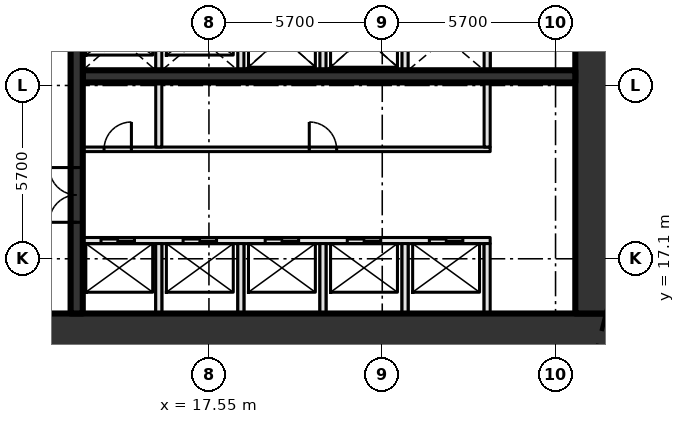
"""IFC4 building model, lengths in metres.
Left out: names, types, materials, properties, quantities, classifications, styles, units other than length and angle.
Written with IfcOpenShell. Run it as: python <this file> out.ifc"""

import sys

from ifc_helpers import new_model, si_unit, direction, frame, frame_2d, origin, place, context, subcontext, project, spatial, rectangle, extrude, element, fill, save


model = new_model("IFC4")
c1 = context("Model", 3, precision=1e-05, world=origin(), true_north=direction((0.0, 1.0)))
c2 = subcontext(c1, "Body", "Model", "MODEL_VIEW")
j1 = project(units=[si_unit("LENGTHUNIT", "METRE"), si_unit("PLANEANGLEUNIT", "RADIAN")], contexts=[c1])
p1 = place(None, origin())
s1 = spatial("IfcSite", under=j1, at=p1, CompositionType="ELEMENT")
p2 = place(p1, origin())
s2 = spatial("IfcBuilding", under=s1, at=p2, CompositionType="ELEMENT")
p3 = place(p2, frame((0.0, 0.0, 12.6)))
s3 = spatial("IfcBuildingStorey", under=s2, at=p3, CompositionType="ELEMENT", Elevation=12.6)
p4 = place(p3, frame((8.0, 14.7, -0.45), z_axis=(0.0, 0.0, 1.0), x_axis=(1.0, 0.0, 0.0)))
e1 = element("IfcWall", 1, at=p4, inside=s3, PredefinedType="SHEAR", context=c2, shape_type="SweptSolid", body=[
    extrude(rectangle(XDim=22.8, YDim=1.2, at=frame_2d((11.4, 0.0))), origin(), (0.0, 0.0, 1.0), 6.0),
])
p5 = place(p4, frame((2.3, 0.0, 0.45)))
e2 = element("IfcOpeningElement", 2, at=p5, cuts=e1, PredefinedType="OPENING", context=c2, shape_type="SweptSolid", body=[
    extrude(rectangle(XDim=1.8, YDim=2.1, at=frame_2d((0.9, 1.05))), frame((0.0, 0.61, 0.0), z_axis=(0.0, -1.0, 0.0), x_axis=(1.0, 0.0, 0.0)), (0.0, 0.0, 1.0), 1.22),
])
p6 = place(p3, frame((30.2, 15.3, -0.45), z_axis=(0.0, 0.0, 1.0), x_axis=(0.0, 1.0, 0.0)))
e3 = element("IfcWall", 3, at=p6, inside=s3, PredefinedType="SHEAR", context=c2, shape_type="SweptSolid", body=[
    extrude(rectangle(XDim=20.4, YDim=1.2, at=frame_2d((10.2, 0.0))), origin(), (0.0, 0.0, 1.0), 6.0),
])
p7 = place(p3, frame((13.4, 17.7, 0.0), z_axis=(0.0, 0.0, 1.0), x_axis=(1.0, 0.0, 0.0)))
e4 = element("IfcWall", 4, at=p7, inside=s3, PredefinedType="SOLIDWALL", context=c2, shape_type="SweptSolid", body=[
    extrude(rectangle(XDim=13.4, YDim=0.2, at=frame_2d((6.7, 0.0))), origin(), (0.0, 0.0, 1.0), 5.55),
])
p8 = place(p7, frame((0.6, 0.0, 0.0)))
e5 = element("IfcOpeningElement", 5, at=p8, cuts=e4, PredefinedType="OPENING", context=c2, shape_type="SweptSolid", body=[
    extrude(rectangle(XDim=1.1, YDim=2.1, at=frame_2d((0.55, 1.05))), frame((0.0, 0.11, 0.0), z_axis=(0.0, -1.0, 0.0), x_axis=(1.0, 0.0, 0.0)), (0.0, 0.0, 1.0), 0.22),
])
p9 = place(p7, frame((3.3, 0.0, 0.0)))
e6 = element("IfcOpeningElement", 6, at=p9, cuts=e4, PredefinedType="OPENING", context=c2, shape_type="SweptSolid", body=[
    extrude(rectangle(XDim=1.1, YDim=2.1, at=frame_2d((0.55, 1.05))), frame((0.0, 0.11, 0.0), z_axis=(0.0, -1.0, 0.0), x_axis=(1.0, 0.0, 0.0)), (0.0, 0.0, 1.0), 0.22),
])
p10 = place(p7, frame((6.0, 0.0, 0.0)))
e7 = element("IfcOpeningElement", 7, at=p10, cuts=e4, PredefinedType="OPENING", context=c2, shape_type="SweptSolid", body=[
    extrude(rectangle(XDim=1.1, YDim=2.1, at=frame_2d((0.55, 1.05))), frame((0.0, 0.11, 0.0), z_axis=(0.0, -1.0, 0.0), x_axis=(1.0, 0.0, 0.0)), (0.0, 0.0, 1.0), 0.22),
])
p11 = place(p7, frame((8.7, 0.0, 0.0)))
e8 = element("IfcOpeningElement", 8, at=p11, cuts=e4, PredefinedType="OPENING", context=c2, shape_type="SweptSolid", body=[
    extrude(rectangle(XDim=1.1, YDim=2.1, at=frame_2d((0.55, 1.05))), frame((0.0, 0.11, 0.0), z_axis=(0.0, -1.0, 0.0), x_axis=(1.0, 0.0, 0.0)), (0.0, 0.0, 1.0), 0.22),
])
p12 = place(p7, frame((11.4, 0.0, 0.0)))
e9 = element("IfcOpeningElement", 9, at=p12, cuts=e4, PredefinedType="OPENING", context=c2, shape_type="SweptSolid", body=[
    extrude(rectangle(XDim=1.1, YDim=2.1, at=frame_2d((0.55, 1.05))), frame((0.0, 0.11, 0.0), z_axis=(0.0, -1.0, 0.0), x_axis=(1.0, 0.0, 0.0)), (0.0, 0.0, 1.0), 0.22),
])
p13 = place(p3, frame((13.4, 20.7, 0.0), z_axis=(0.0, 0.0, 1.0), x_axis=(1.0, 0.0, 0.0)))
e10 = element("IfcWall", 10, at=p13, inside=s3, PredefinedType="PARTITIONING", context=c2, shape_type="SweptSolid", body=[
    extrude(rectangle(XDim=13.4, YDim=0.15, at=frame_2d((6.7, 0.0))), origin(), (0.0, 0.0, 1.0), 5.55),
])
p14 = place(p13, frame((0.7, 0.0, 0.0)))
e11 = element("IfcOpeningElement", 11, at=p14, cuts=e10, PredefinedType="OPENING", context=c2, shape_type="SweptSolid", body=[
    extrude(rectangle(XDim=0.9, YDim=2.1, at=frame_2d((0.45, 1.05))), frame((0.0, 0.085, 0.0), z_axis=(0.0, -1.0, 0.0), x_axis=(1.0, 0.0, 0.0)), (0.0, 0.0, 1.0), 0.17),
])
p15 = place(p13, frame((7.45, 0.0, 0.0)))
e12 = element("IfcOpeningElement", 12, at=p15, cuts=e10, PredefinedType="OPENING", context=c2, shape_type="SweptSolid", body=[
    extrude(rectangle(XDim=0.9, YDim=2.1, at=frame_2d((0.45, 1.05))), frame((0.0, 0.085, 0.0), z_axis=(0.0, -1.0, 0.0), x_axis=(1.0, 0.0, 0.0)), (0.0, 0.0, 1.0), 0.17),
])
p16 = place(p3, frame((13.4, 23.1, 0.0), z_axis=(0.0, 0.0, 1.0), x_axis=(1.0, 0.0, 0.0)))
e13 = element("IfcWall", 13, at=p16, inside=s3, PredefinedType="SHEAR", context=c2, shape_type="SweptSolid", body=[
    extrude(rectangle(XDim=16.2, YDim=0.4, at=frame_2d((8.1, 0.0))), origin(), (0.0, 0.0, 1.0), 5.55),
])
p17 = place(p3, frame((13.2, 15.3, 0.0), z_axis=(0.0, 0.0, 1.0), x_axis=(0.0, 1.0, 0.0)))
e14 = element("IfcWall", 14, at=p17, inside=s3, PredefinedType="SHEAR", context=c2, shape_type="SweptSolid", body=[
    extrude(rectangle(XDim=20.4, YDim=0.4, at=frame_2d((10.2, 0.0))), origin(), (0.0, 0.0, 1.0), 5.55),
])
p18 = place(p17, frame((3.0, 0.0, 0.0)))
e15 = element("IfcOpeningElement", 15, at=p18, cuts=e14, PredefinedType="OPENING", context=c2, shape_type="SweptSolid", body=[
    extrude(rectangle(XDim=1.8, YDim=2.1, at=frame_2d((0.9, 1.05))), frame((0.0, 0.21, 0.0), z_axis=(0.0, -1.0, 0.0), x_axis=(1.0, 0.0, 0.0)), (0.0, 0.0, 1.0), 0.42),
])
p19 = place(p17, frame((11.1, 0.0, 0.0)))
e16 = element("IfcOpeningElement", 16, at=p19, cuts=e14, PredefinedType="OPENING", context=c2, shape_type="SweptSolid", body=[
    extrude(rectangle(XDim=1.2, YDim=2.1, at=frame_2d((0.6, 1.05))), frame((0.0, 0.21, 0.0), z_axis=(0.0, -1.0, 0.0), x_axis=(1.0, 0.0, 0.0)), (0.0, 0.0, 1.0), 0.42),
])
p20 = place(p3, frame((15.9, 15.3, 0.0), z_axis=(0.0, 0.0, 1.0), x_axis=(0.0, 1.0, 0.0)))
e17 = element("IfcWall", 17, at=p20, inside=s3, PredefinedType="SOLIDWALL", context=c2, shape_type="SweptSolid", body=[
    extrude(rectangle(XDim=2.3, YDim=0.2, at=frame_2d((1.15, 0.0))), origin(), (0.0, 0.0, 1.0), 5.55),
])
p21 = place(p3, frame((15.9, 20.775, 0.0), z_axis=(0.0, 0.0, 1.0), x_axis=(0.0, 1.0, 0.0)))
e18 = element("IfcWall", 18, at=p21, inside=s3, PredefinedType="SOLIDWALL", context=c2, shape_type="SweptSolid", body=[
    extrude(rectangle(XDim=4.625, YDim=0.2, at=frame_2d((2.312, 0.0))), origin(), (0.0, 0.0, 1.0), 5.55),
])
p22 = place(p3, frame((18.6, 15.3, 0.0), z_axis=(0.0, 0.0, 1.0), x_axis=(0.0, 1.0, 0.0)))
e19 = element("IfcWall", 19, at=p22, inside=s3, PredefinedType="SOLIDWALL", context=c2, shape_type="SweptSolid", body=[
    extrude(rectangle(XDim=2.3, YDim=0.2, at=frame_2d((1.15, 0.0))), origin(), (0.0, 0.0, 1.0), 5.55),
])
p23 = place(p3, frame((18.6, 23.3, 0.0), z_axis=(0.0, 0.0, 1.0), x_axis=(0.0, 1.0, 0.0)))
e20 = element("IfcWall", 20, at=p23, inside=s3, PredefinedType="SOLIDWALL", context=c2, shape_type="SweptSolid", body=[
    extrude(rectangle(XDim=5.1, YDim=0.2, at=frame_2d((2.55, 0.0))), origin(), (0.0, 0.0, 1.0), 5.55),
])
p24 = place(p23, frame((3.1, 0.0, 0.0)))
e21 = element("IfcOpeningElement", 21, at=p24, cuts=e20, PredefinedType="OPENING", context=c2, shape_type="SweptSolid", body=[
    extrude(rectangle(XDim=1.2, YDim=2.1, at=frame_2d((0.6, 1.05))), frame((0.0, 0.11, 0.0), z_axis=(0.0, -1.0, 0.0), x_axis=(1.0, 0.0, 0.0)), (0.0, 0.0, 1.0), 0.22),
])
p25 = place(p3, frame((21.3, 15.3, 0.0), z_axis=(0.0, 0.0, 1.0), x_axis=(0.0, 1.0, 0.0)))
e22 = element("IfcWall", 22, at=p25, inside=s3, PredefinedType="SOLIDWALL", context=c2, shape_type="SweptSolid", body=[
    extrude(rectangle(XDim=2.3, YDim=0.2, at=frame_2d((1.15, 0.0))), origin(), (0.0, 0.0, 1.0), 5.55),
])
p26 = place(p3, frame((21.3, 23.3, 0.0), z_axis=(0.0, 0.0, 1.0), x_axis=(0.0, 1.0, 0.0)))
e23 = element("IfcWall", 23, at=p26, inside=s3, PredefinedType="SOLIDWALL", context=c2, shape_type="SweptSolid", body=[
    extrude(rectangle(XDim=2.1, YDim=0.2, at=frame_2d((1.05, 0.0))), origin(), (0.0, 0.0, 1.0), 5.55),
])
p27 = place(p3, frame((24.0, 15.3, 0.0), z_axis=(0.0, 0.0, 1.0), x_axis=(0.0, 1.0, 0.0)))
e24 = element("IfcWall", 24, at=p27, inside=s3, PredefinedType="SOLIDWALL", context=c2, shape_type="SweptSolid", body=[
    extrude(rectangle(XDim=2.3, YDim=0.2, at=frame_2d((1.15, 0.0))), origin(), (0.0, 0.0, 1.0), 5.55),
])
p28 = place(p3, frame((24.0, 23.3, 0.0), z_axis=(0.0, 0.0, 1.0), x_axis=(0.0, 1.0, 0.0)))
e25 = element("IfcWall", 25, at=p28, inside=s3, PredefinedType="SOLIDWALL", context=c2, shape_type="SweptSolid", body=[
    extrude(rectangle(XDim=2.1, YDim=0.2, at=frame_2d((1.05, 0.0))), origin(), (0.0, 0.0, 1.0), 5.55),
])
p29 = place(p3, frame((26.7, 15.3, 0.0), z_axis=(0.0, 0.0, 1.0), x_axis=(0.0, 1.0, 0.0)))
e26 = element("IfcWall", 26, at=p29, inside=s3, PredefinedType="SOLIDWALL", context=c2, shape_type="SweptSolid", body=[
    extrude(rectangle(XDim=2.3, YDim=0.2, at=frame_2d((1.15, 0.0))), origin(), (0.0, 0.0, 1.0), 5.55),
])
p30 = place(p3, frame((26.7, 20.775, 0.0), z_axis=(0.0, 0.0, 1.0), x_axis=(0.0, 1.0, 0.0)))
e27 = element("IfcWall", 27, at=p30, inside=s3, PredefinedType="SOLIDWALL", context=c2, shape_type="SweptSolid", body=[
    extrude(rectangle(XDim=4.625, YDim=0.2, at=frame_2d((2.312, 0.0))), origin(), (0.0, 0.0, 1.0), 5.55),
])
p31 = place(p8, origin())
e28 = element("IfcDoor", 28, at=p31, inside=s3, OperationType="SLIDING_TO_LEFT", PredefinedType="DOOR", context=c2, shape_type="SweptSolid", body=[
    extrude(rectangle(XDim=1.1, YDim=2.1, at=frame_2d((0.55, 1.05))), frame((0.0, 0.025, 0.0), z_axis=(0.0, -1.0, 0.0), x_axis=(1.0, 0.0, 0.0)), (0.0, 0.0, 1.0), 0.05),
])
fill(e5, e28)
p32 = place(p9, origin())
e29 = element("IfcDoor", 29, at=p32, inside=s3, OperationType="SLIDING_TO_LEFT", PredefinedType="DOOR", context=c2, shape_type="SweptSolid", body=[
    extrude(rectangle(XDim=1.1, YDim=2.1, at=frame_2d((0.55, 1.05))), frame((0.0, 0.025, 0.0), z_axis=(0.0, -1.0, 0.0), x_axis=(1.0, 0.0, 0.0)), (0.0, 0.0, 1.0), 0.05),
])
fill(e6, e29)
p33 = place(p10, origin())
e30 = element("IfcDoor", 30, at=p33, inside=s3, OperationType="SLIDING_TO_LEFT", PredefinedType="DOOR", context=c2, shape_type="SweptSolid", body=[
    extrude(rectangle(XDim=1.1, YDim=2.1, at=frame_2d((0.55, 1.05))), frame((0.0, 0.025, 0.0), z_axis=(0.0, -1.0, 0.0), x_axis=(1.0, 0.0, 0.0)), (0.0, 0.0, 1.0), 0.05),
])
fill(e7, e30)
p34 = place(p11, origin())
e31 = element("IfcDoor", 31, at=p34, inside=s3, OperationType="SLIDING_TO_LEFT", PredefinedType="DOOR", context=c2, shape_type="SweptSolid", body=[
    extrude(rectangle(XDim=1.1, YDim=2.1, at=frame_2d((0.55, 1.05))), frame((0.0, 0.025, 0.0), z_axis=(0.0, -1.0, 0.0), x_axis=(1.0, 0.0, 0.0)), (0.0, 0.0, 1.0), 0.05),
])
fill(e8, e31)
p35 = place(p12, origin())
e32 = element("IfcDoor", 32, at=p35, inside=s3, OperationType="SLIDING_TO_LEFT", PredefinedType="DOOR", context=c2, shape_type="SweptSolid", body=[
    extrude(rectangle(XDim=1.1, YDim=2.1, at=frame_2d((0.55, 1.05))), frame((0.0, 0.025, 0.0), z_axis=(0.0, -1.0, 0.0), x_axis=(1.0, 0.0, 0.0)), (0.0, 0.0, 1.0), 0.05),
])
fill(e9, e32)
p36 = place(p14, origin())
e33 = element("IfcDoor", 33, at=p36, inside=s3, OperationType="SINGLE_SWING_RIGHT", PredefinedType="DOOR", context=c2, shape_type="SweptSolid", body=[
    extrude(rectangle(XDim=0.9, YDim=2.1, at=frame_2d((0.45, 1.05))), frame((0.0, 0.025, 0.0), z_axis=(0.0, -1.0, 0.0), x_axis=(1.0, 0.0, 0.0)), (0.0, 0.0, 1.0), 0.05),
])
fill(e11, e33)
p37 = place(p15, origin())
e34 = element("IfcDoor", 34, at=p37, inside=s3, OperationType="SINGLE_SWING_LEFT", PredefinedType="DOOR", context=c2, shape_type="SweptSolid", body=[
    extrude(rectangle(XDim=0.9, YDim=2.1, at=frame_2d((0.45, 1.05))), frame((0.0, 0.025, 0.0), z_axis=(0.0, -1.0, 0.0), x_axis=(1.0, 0.0, 0.0)), (0.0, 0.0, 1.0), 0.05),
])
fill(e12, e34)
p38 = place(p18, origin())
e35 = element("IfcDoor", 35, at=p38, inside=s3, OperationType="DOUBLE_DOOR_SINGLE_SWING", PredefinedType="DOOR", context=c2, shape_type="SweptSolid", body=[
    extrude(rectangle(XDim=1.8, YDim=2.1, at=frame_2d((0.9, 1.05))), frame((0.0, 0.025, 0.0), z_axis=(0.0, -1.0, 0.0), x_axis=(1.0, 0.0, 0.0)), (0.0, 0.0, 1.0), 0.05),
])
fill(e15, e35)
save(model, sys.argv[1])
